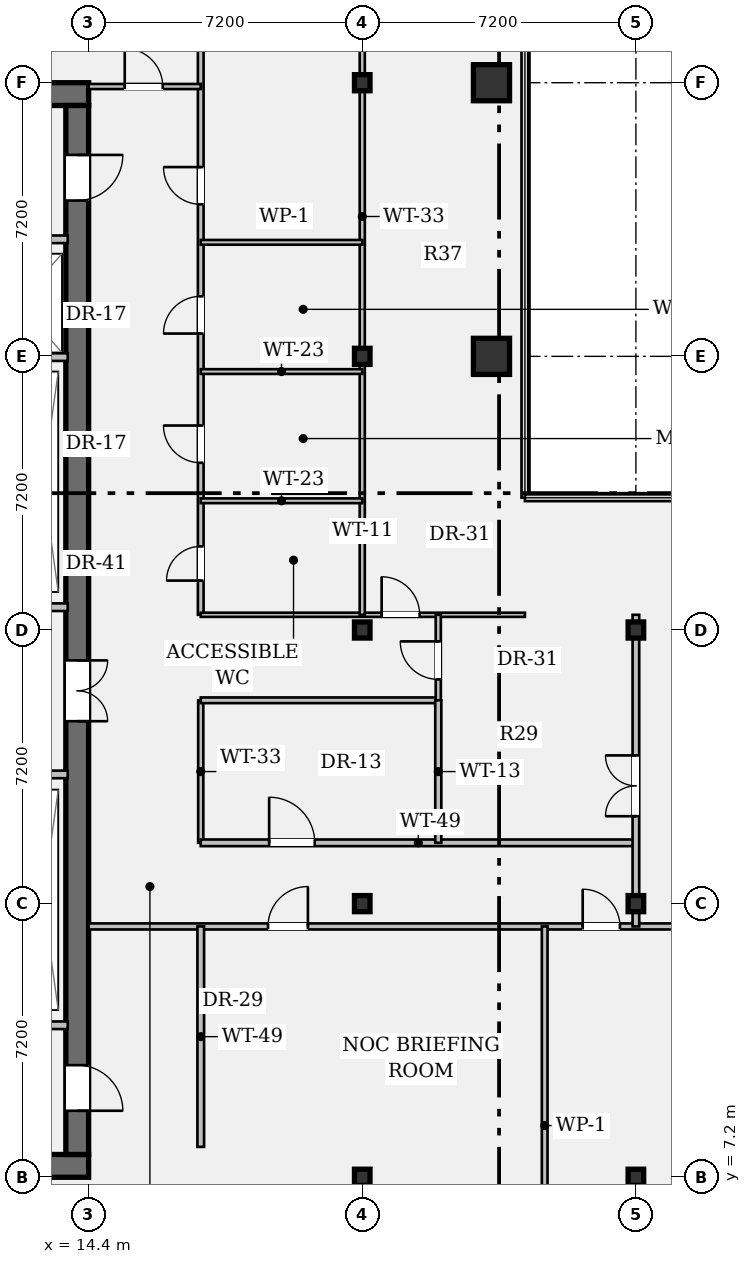
"""IFC4 building model, lengths in metres.
Left out: names, types, materials, properties, quantities, classifications, styles, units other than length and angle.
Written with IfcOpenShell. Run it as: python <this file> out.ifc"""

import sys

from ifc_helpers import new_model, si_unit, direction, frame, frame_2d, origin, origin_2d, place, context, subcontext, project, spatial, rectangle, hollow_rectangle, i_section, extrude, element, fill, save


model = new_model("IFC4")
c1 = context("Model", 3, precision=1e-05, world=origin(), true_north=direction((0.0, 1.0)))
c2 = subcontext(c1, "Body", "Model", "MODEL_VIEW")
j1 = project(units=[si_unit("LENGTHUNIT", "METRE"), si_unit("PLANEANGLEUNIT", "RADIAN")], contexts=[c1])
p1 = place(None, origin())
s1 = spatial("IfcSite", under=j1, at=p1, CompositionType="ELEMENT")
p2 = place(p1, origin())
s2 = spatial("IfcBuilding", under=s1, at=p2, CompositionType="ELEMENT")
p3 = place(p2, frame((0.0, 0.0, 97.65)))
s3 = spatial("IfcBuildingStorey", under=s2, at=p3, CompositionType="ELEMENT", Elevation=97.65)
for number, where, z_axis, x_axis in (
    (1, (0.6, 7.5, 0.0), (0.0, 0.0, 1.0), (1.0, 0.0, 0.0)),
    (2, (0.6, 35.7, 0.0), (0.0, 0.0, 1.0), (1.0, 0.0, 0.0)),
):
    element("IfcWall", number, at=place(p3, frame(where, z_axis=z_axis, x_axis=x_axis)), inside=s3, PredefinedType="SHEAR", context=c2, shape_type="SweptSolid", body=[
        extrude(rectangle(XDim=13.8, YDim=0.6, at=frame_2d((6.9, 0.0))), origin(), (0.0, 0.0, 1.0), 4.28),
    ])
p4 = place(p3, frame((14.1, 35.4, 0.0), z_axis=(0.0, 0.0, 1.0), x_axis=(0.0, -1.0, 0.0)))
e3 = element("IfcWall", 3, at=p4, inside=s3, PredefinedType="SHEAR", context=c2, shape_type="SweptSolid", body=[
    extrude(rectangle(XDim=27.6, YDim=0.6, at=frame_2d((13.8, 0.0))), origin(), (0.0, 0.0, 1.0), 4.28),
])
p5 = place(p4, frame((1.3, 0.0, 0.0)))
e4 = element("IfcOpeningElement", 4, at=p5, cuts=e3, PredefinedType="OPENING", context=c2, shape_type="SweptSolid", body=[
    extrude(rectangle(XDim=1.2, YDim=2.15, at=frame_2d((0.6, 1.075))), frame((0.0, 0.312, 0.0), z_axis=(0.0, -1.0, 0.0), x_axis=(1.0, 0.0, 0.0)), (0.0, 0.0, 1.0), 0.624),
])
p6 = place(p4, frame((25.25, 0.0, 0.0)))
e5 = element("IfcOpeningElement", 5, at=p6, cuts=e3, PredefinedType="OPENING", context=c2, shape_type="SweptSolid", body=[
    extrude(rectangle(XDim=1.2, YDim=2.15, at=frame_2d((0.6, 1.075))), frame((0.0, 0.312, 0.0), z_axis=(0.0, -1.0, 0.0), x_axis=(1.0, 0.0, 0.0)), (0.0, 0.0, 1.0), 0.624),
])
p7 = place(p4, frame((14.6, 0.0, 0.0)))
e6 = element("IfcOpeningElement", 6, at=p7, cuts=e3, PredefinedType="OPENING", context=c2, shape_type="SweptSolid", body=[
    extrude(rectangle(XDim=1.6, YDim=2.2, at=frame_2d((0.8, 1.1))), frame((0.0, 0.312, 0.0), z_axis=(0.0, -1.0, 0.0), x_axis=(1.0, 0.0, 0.0)), (0.0, 0.0, 1.0), 0.624),
])
for number, where, z_axis, x_axis in (
    (7, (21.6, 7.2, 0.0), (0.0, 0.0, 1.0), (1.0, 0.0, 0.0)),
    (8, (21.6, 14.4, 0.0), (0.0, 0.0, 1.0), (1.0, 0.0, 0.0)),
    (9, (21.6, 21.6, 0.0), (0.0, 0.0, 1.0), (1.0, 0.0, 0.0)),
    (10, (21.6, 28.8, 0.0), (0.0, 0.0, 1.0), (1.0, 0.0, 0.0)),
    (11, (21.6, 36.0, 0.0), (0.0, 0.0, 1.0), (1.0, 0.0, 0.0)),
):
    element("IfcColumn", number, at=place(p3, frame(where, z_axis=z_axis, x_axis=x_axis)), inside=s3, PredefinedType="COLUMN", context=c2, shape_type="SweptSolid", body=[
        extrude(i_section(OverallWidth=0.409, OverallDepth=0.424, WebThickness=0.033, FlangeThickness=0.052, FilletRadius=0.018, at=origin_2d()), origin(), (0.0, 0.0, 1.0), 4.28),
    ])
for number, where, z_axis, x_axis in (
    (12, (25.0, 28.8, 0.0), (0.0, 0.0, 1.0), (1.0, 0.0, 0.0)),
    (13, (25.0, 36.0, 0.0), (0.0, 0.0, 1.0), (1.0, 0.0, 0.0)),
):
    element("IfcColumn", number, at=place(p3, frame(where, z_axis=z_axis, x_axis=x_axis)), inside=s3, PredefinedType="COLUMN", context=c2, shape_type="SweptSolid", body=[
        extrude(hollow_rectangle(XDim=0.95, YDim=0.95, WallThickness=0.06, at=origin_2d()), origin(), (0.0, 0.0, 1.0), 4.28),
    ])
for number, where, z_axis, x_axis in (
    (14, (28.8, 7.2, 0.0), (0.0, 0.0, 1.0), (1.0, 0.0, 0.0)),
    (15, (28.8, 14.4, 0.0), (0.0, 0.0, 1.0), (1.0, 0.0, 0.0)),
    (16, (28.8, 21.6, 0.0), (0.0, 0.0, 1.0), (1.0, 0.0, 0.0)),
):
    element("IfcColumn", number, at=place(p3, frame(where, z_axis=z_axis, x_axis=x_axis)), inside=s3, PredefinedType="COLUMN", context=c2, shape_type="SweptSolid", body=[
        extrude(i_section(OverallWidth=0.409, OverallDepth=0.424, WebThickness=0.033, FlangeThickness=0.052, FilletRadius=0.018, at=origin_2d()), origin(), (0.0, 0.0, 1.0), 4.28),
    ])
p8 = place(p3, frame((8.7, 31.88, 0.0), z_axis=(0.0, 0.0, 1.0), x_axis=(1.0, 0.0, 0.0)))
e17 = element("IfcWall", 17, at=p8, inside=s3, PredefinedType="PARTITIONING", context=c2, shape_type="SweptSolid", body=[
    extrude(rectangle(XDim=5.15, YDim=0.2, at=frame_2d((2.575, 0.0))), origin(), (0.0, 0.0, 1.0), 4.28),
])
p9 = place(p8, frame((0.75, 0.0, 0.0)))
e18 = element("IfcOpeningElement", 18, at=p9, cuts=e17, PredefinedType="OPENING", context=c2, shape_type="SweptSolid", body=[
    extrude(rectangle(XDim=1.2, YDim=2.2, at=frame_2d((0.6, 1.1))), frame((0.0, 0.112, 0.0), z_axis=(0.0, -1.0, 0.0), x_axis=(1.0, 0.0, 0.0)), (0.0, 0.0, 1.0), 0.224),
])
p10 = place(p8, frame((3.25, 0.0, 0.0)))
e19 = element("IfcOpeningElement", 19, at=p10, cuts=e17, PredefinedType="OPENING", context=c2, shape_type="SweptSolid", body=[
    extrude(rectangle(XDim=1.2, YDim=2.2, at=frame_2d((0.6, 1.1))), frame((0.0, 0.112, 0.0), z_axis=(0.0, -1.0, 0.0), x_axis=(1.0, 0.0, 0.0)), (0.0, 0.0, 1.0), 0.224),
])
for number, where, z_axis, x_axis in (
    (20, (8.7, 11.2, 0.0), (0.0, 0.0, 1.0), (1.0, 0.0, 0.0)),
    (21, (8.7, 28.78, 0.0), (0.0, 0.0, 1.0), (1.0, 0.0, 0.0)),
):
    element("IfcWall", number, at=place(p3, frame(where, z_axis=z_axis, x_axis=x_axis)), inside=s3, PredefinedType="PARTITIONING", context=c2, shape_type="SweptSolid", body=[
        extrude(rectangle(XDim=5.15, YDim=0.2, at=frame_2d((2.575, 0.0))), origin(), (0.0, 0.0, 1.0), 4.28),
    ])
for number, where, z_axis, x_axis in (
    (22, (7.1, 22.2, 0.0), (0.0, 0.0, 1.0), (1.0, 0.0, 0.0)),
    (23, (7.1, 17.8, 0.0), (0.0, 0.0, 1.0), (1.0, 0.0, 0.0)),
):
    element("IfcWall", number, at=place(p3, frame(where, z_axis=z_axis, x_axis=x_axis)), inside=s3, PredefinedType="PARTITIONING", context=c2, shape_type="SweptSolid", body=[
        extrude(rectangle(XDim=6.75, YDim=0.2, at=frame_2d((3.375, 0.0))), origin(), (0.0, 0.0, 1.0), 4.28),
    ])
p11 = place(p3, frame((17.35, 22.0, 0.0), z_axis=(0.0, 0.0, 1.0), x_axis=(0.0, 1.0, 0.0)))
e24 = element("IfcWall", 24, at=p11, inside=s3, PredefinedType="PARTITIONING", context=c2, shape_type="SweptSolid", body=[
    extrude(rectangle(XDim=20.96, YDim=0.15, at=frame_2d((10.48, 0.0))), origin(), (0.0, 0.0, 1.0), 3.493),
])
p12 = place(p11, frame((0.9, 0.0, 0.0)))
e25 = element("IfcOpeningElement", 25, at=p12, cuts=e24, PredefinedType="OPENING", context=c2, shape_type="SweptSolid", body=[
    extrude(rectangle(XDim=0.9, YDim=2.15, at=frame_2d((0.45, 1.075))), frame((0.0, 0.087, 0.0), z_axis=(0.0, -1.0, 0.0), x_axis=(1.0, 0.0, 0.0)), (0.0, 0.0, 1.0), 0.174),
])
p13 = place(p11, frame((4.0, 0.0, 0.0)))
e26 = element("IfcOpeningElement", 26, at=p13, cuts=e24, PredefinedType="OPENING", context=c2, shape_type="SweptSolid", body=[
    extrude(rectangle(XDim=0.98, YDim=2.15, at=frame_2d((0.49, 1.075))), frame((0.0, 0.087, 0.0), z_axis=(0.0, -1.0, 0.0), x_axis=(1.0, 0.0, 0.0)), (0.0, 0.0, 1.0), 0.174),
])
p14 = place(p11, frame((7.4, 0.0, 0.0)))
e27 = element("IfcOpeningElement", 27, at=p14, cuts=e24, PredefinedType="OPENING", context=c2, shape_type="SweptSolid", body=[
    extrude(rectangle(XDim=0.98, YDim=2.15, at=frame_2d((0.49, 1.075))), frame((0.0, 0.087, 0.0), z_axis=(0.0, -1.0, 0.0), x_axis=(1.0, 0.0, 0.0)), (0.0, 0.0, 1.0), 0.174),
])
p15 = place(p11, frame((10.8, 0.0, 0.0)))
e28 = element("IfcOpeningElement", 28, at=p15, cuts=e24, PredefinedType="OPENING", context=c2, shape_type="SweptSolid", body=[
    extrude(rectangle(XDim=0.98, YDim=2.15, at=frame_2d((0.49, 1.075))), frame((0.0, 0.087, 0.0), z_axis=(0.0, -1.0, 0.0), x_axis=(1.0, 0.0, 0.0)), (0.0, 0.0, 1.0), 0.174),
])
p16 = place(p3, frame((14.4, 35.9, 0.0), z_axis=(0.0, 0.0, 1.0), x_axis=(1.0, 0.0, 0.0)))
e29 = element("IfcWall", 29, at=p16, inside=s3, PredefinedType="PARTITIONING", context=c2, shape_type="SweptSolid", body=[
    extrude(rectangle(XDim=2.95, YDim=0.135, at=frame_2d((1.475, 0.0))), origin(), (0.0, 0.0, 1.0), 3.493),
])
p17 = place(p16, frame((0.95, 0.0, 0.0)))
e30 = element("IfcOpeningElement", 30, at=p17, cuts=e29, PredefinedType="OPENING", context=c2, shape_type="SweptSolid", body=[
    extrude(rectangle(XDim=1.0, YDim=2.15, at=frame_2d((0.5, 1.075))), frame((0.0, 0.08, 0.0), z_axis=(0.0, -1.0, 0.0), x_axis=(1.0, 0.0, 0.0)), (0.0, 0.0, 1.0), 0.159),
])
p18 = place(p3, frame((17.35, 22.0, 0.0), z_axis=(0.0, 0.0, 1.0), x_axis=(1.0, 0.0, 0.0)))
e31 = element("IfcWall", 31, at=p18, inside=s3, PredefinedType="PARTITIONING", context=c2, shape_type="SweptSolid", body=[
    extrude(rectangle(XDim=8.53, YDim=0.11, at=frame_2d((4.265, 0.0))), origin(), (0.0, 0.0, 1.0), 3.493),
])
p19 = place(p18, frame((4.76, 0.0, 0.0)))
e32 = element("IfcOpeningElement", 32, at=p19, cuts=e31, PredefinedType="OPENING", context=c2, shape_type="SweptSolid", body=[
    extrude(rectangle(XDim=1.0, YDim=2.15, at=frame_2d((0.5, 1.075))), frame((0.0, 0.067, 0.0), z_axis=(0.0, -1.0, 0.0), x_axis=(1.0, 0.0, 0.0)), (0.0, 0.0, 1.0), 0.134),
])
p20 = place(p3, frame((14.4, 13.8, 0.0), z_axis=(0.0, 0.0, 1.0), x_axis=(1.0, 0.0, 0.0)))
e33 = element("IfcWall", 33, at=p20, inside=s3, PredefinedType="PARTITIONING", context=c2, shape_type="SweptSolid", body=[
    extrude(rectangle(XDim=32.68, YDim=0.16, at=frame_2d((16.34, 0.0))), origin(), (0.0, 0.0, 1.0), 3.493),
])
p21 = place(p20, frame((4.72, 0.0, 0.0)))
e34 = element("IfcOpeningElement", 34, at=p21, cuts=e33, PredefinedType="OPENING", context=c2, shape_type="SweptSolid", body=[
    extrude(rectangle(XDim=1.05, YDim=2.15, at=frame_2d((0.525, 1.075))), frame((0.0, 0.092, 0.0), z_axis=(0.0, -1.0, 0.0), x_axis=(1.0, 0.0, 0.0)), (0.0, 0.0, 1.0), 0.184),
])
p22 = place(p20, frame((13.0, 0.0, 0.0)))
e35 = element("IfcOpeningElement", 35, at=p22, cuts=e33, PredefinedType="OPENING", context=c2, shape_type="SweptSolid", body=[
    extrude(rectangle(XDim=0.98, YDim=2.15, at=frame_2d((0.49, 1.075))), frame((0.0, 0.092, 0.0), z_axis=(0.0, -1.0, 0.0), x_axis=(1.0, 0.0, 0.0)), (0.0, 0.0, 1.0), 0.184),
])
p23 = place(p3, frame((26.4, 3.32, 0.0), z_axis=(0.0, 0.0, 1.0), x_axis=(0.0, 1.0, 0.0)))
e36 = element("IfcWall", 36, at=p23, inside=s3, PredefinedType="PARTITIONING", context=c2, shape_type="SweptSolid", body=[
    extrude(rectangle(XDim=10.48, YDim=0.15, at=frame_2d((5.24, 0.0))), origin(), (0.0, 0.0, 1.0), 3.493),
])
p24 = place(p3, frame((21.6, 22.0, 0.0), z_axis=(0.0, 0.0, 1.0), x_axis=(0.0, 1.0, 0.0)))
e37 = element("IfcWall", 37, at=p24, inside=s3, PredefinedType="PARTITIONING", context=c2, shape_type="SweptSolid", body=[
    extrude(rectangle(XDim=20.96, YDim=0.135, at=frame_2d((10.48, 0.0))), origin(), (0.0, 0.0, 1.0), 3.493),
])
for number, where, z_axis, x_axis in (
    (38, (17.35, 25.0, 0.0), (0.0, 0.0, 1.0), (1.0, 0.0, 0.0)),
    (39, (17.35, 28.4, 0.0), (0.0, 0.0, 1.0), (1.0, 0.0, 0.0)),
    (40, (17.35, 31.8, 0.0), (0.0, 0.0, 1.0), (1.0, 0.0, 0.0)),
):
    element("IfcWall", number, at=place(p3, frame(where, z_axis=z_axis, x_axis=x_axis)), inside=s3, PredefinedType="PARTITIONING", context=c2, shape_type="SweptSolid", body=[
        extrude(rectangle(XDim=4.25, YDim=0.125, at=frame_2d((2.125, 0.0))), origin(), (0.0, 0.0, 1.0), 3.493),
    ])
p25 = place(p3, frame((17.35, 16.0, 0.0), z_axis=(0.0, 0.0, 1.0), x_axis=(0.0, 1.0, 0.0)))
e41 = element("IfcWall", 41, at=p25, inside=s3, PredefinedType="PARTITIONING", context=c2, shape_type="SweptSolid", body=[
    extrude(rectangle(XDim=3.75, YDim=0.135, at=frame_2d((1.875, 0.0))), origin(), (0.0, 0.0, 1.0), 4.28),
])
p26 = place(p3, frame((17.35, 8.0, 0.0), z_axis=(0.0, 0.0, 1.0), x_axis=(0.0, 1.0, 0.0)))
e42 = element("IfcWall", 42, at=p26, inside=s3, PredefinedType="PARTITIONING", context=c2, shape_type="SweptSolid", body=[
    extrude(rectangle(XDim=5.8, YDim=0.175, at=frame_2d((2.9, 0.0))), origin(), (0.0, 0.0, 1.0), 4.28),
])
p27 = place(p3, frame((17.35, 16.0, 0.0), z_axis=(0.0, 0.0, 1.0), x_axis=(1.0, 0.0, 0.0)))
e43 = element("IfcWall", 43, at=p27, inside=s3, PredefinedType="PARTITIONING", context=c2, shape_type="SweptSolid", body=[
    extrude(rectangle(XDim=11.45, YDim=0.175, at=frame_2d((5.725, 0.0))), origin(), (0.0, 0.0, 1.0), 3.493),
])
p28 = place(p27, frame((1.8, 0.0, 0.0)))
e44 = element("IfcOpeningElement", 44, at=p28, cuts=e43, PredefinedType="OPENING", context=c2, shape_type="SweptSolid", body=[
    extrude(rectangle(XDim=1.2, YDim=2.15, at=frame_2d((0.6, 1.075))), frame((0.0, 0.1, 0.0), z_axis=(0.0, -1.0, 0.0), x_axis=(1.0, 0.0, 0.0)), (0.0, 0.0, 1.0), 0.199),
])
p29 = place(p3, frame((17.35, 19.75, 0.0), z_axis=(0.0, 0.0, 1.0), x_axis=(1.0, 0.0, 0.0)))
e45 = element("IfcWall", 45, at=p29, inside=s3, PredefinedType="PARTITIONING", context=c2, shape_type="SweptSolid", body=[
    extrude(rectangle(XDim=6.25, YDim=0.15, at=frame_2d((3.125, 0.0))), origin(), (0.0, 0.0, 1.0), 3.493),
])
p30 = place(p3, frame((23.6, 19.75, 0.0), z_axis=(0.0, 0.0, 1.0), x_axis=(0.0, 1.0, 0.0)))
e46 = element("IfcWall", 46, at=p30, inside=s3, PredefinedType="PARTITIONING", context=c2, shape_type="SweptSolid", body=[
    extrude(rectangle(XDim=2.25, YDim=0.135, at=frame_2d((1.125, 0.0))), origin(), (0.0, 0.0, 1.0), 3.493),
])
p31 = place(p30, frame((0.55, 0.0, 0.0)))
e47 = element("IfcOpeningElement", 47, at=p31, cuts=e46, PredefinedType="OPENING", context=c2, shape_type="SweptSolid", body=[
    extrude(rectangle(XDim=1.0, YDim=2.15, at=frame_2d((0.5, 1.075))), frame((0.0, 0.08, 0.0), z_axis=(0.0, -1.0, 0.0), x_axis=(1.0, 0.0, 0.0)), (0.0, 0.0, 1.0), 0.159),
])
p32 = place(p3, frame((28.8, 13.8, 0.0), z_axis=(0.0, 0.0, 1.0), x_axis=(0.0, 1.0, 0.0)))
e48 = element("IfcWall", 48, at=p32, inside=s3, PredefinedType="PARTITIONING", context=c2, shape_type="SweptSolid", body=[
    extrude(rectangle(XDim=8.2, YDim=0.175, at=frame_2d((4.1, 0.0))), origin(), (0.0, 0.0, 1.0), 3.493),
])
p33 = place(p32, frame((2.9, 0.0, 0.0)))
e49 = element("IfcOpeningElement", 49, at=p33, cuts=e48, PredefinedType="OPENING", context=c2, shape_type="SweptSolid", body=[
    extrude(rectangle(XDim=1.6, YDim=2.2, at=frame_2d((0.8, 1.1))), frame((0.0, 0.1, 0.0), z_axis=(0.0, -1.0, 0.0), x_axis=(1.0, 0.0, 0.0)), (0.0, 0.0, 1.0), 0.199),
])
p34 = place(p3, frame((23.6, 16.0, 0.0), z_axis=(0.0, 0.0, 1.0), x_axis=(0.0, 1.0, 0.0)))
e50 = element("IfcWall", 50, at=p34, inside=s3, PredefinedType="PARTITIONING", context=c2, shape_type="SweptSolid", body=[
    extrude(rectangle(XDim=3.75, YDim=0.16, at=frame_2d((1.875, 0.0))), origin(), (0.0, 0.0, 1.0), 4.28),
])
p35 = place(p5, origin())
e51 = element("IfcDoor", 51, at=p35, inside=s3, OperationType="SINGLE_SWING_LEFT", PredefinedType="DOOR", context=c2, shape_type="SweptSolid", body=[
    extrude(rectangle(XDim=1.2, YDim=2.15, at=frame_2d((0.6, 1.075))), frame((0.0, 0.025, 0.0), z_axis=(0.0, -1.0, 0.0), x_axis=(1.0, 0.0, 0.0)), (0.0, 0.0, 1.0), 0.05),
])
fill(e4, e51)
p36 = place(p6, origin())
e52 = element("IfcDoor", 52, at=p36, inside=s3, OperationType="SINGLE_SWING_RIGHT", PredefinedType="DOOR", context=c2, shape_type="SweptSolid", body=[
    extrude(rectangle(XDim=1.2, YDim=2.15, at=frame_2d((0.6, 1.075))), frame((0.0, 0.025, 0.0), z_axis=(0.0, -1.0, 0.0), x_axis=(1.0, 0.0, 0.0)), (0.0, 0.0, 1.0), 0.05),
])
fill(e5, e52)
p37 = place(p7, origin())
e53 = element("IfcDoor", 53, at=p37, inside=s3, OperationType="DOUBLE_DOOR_SINGLE_SWING", PredefinedType="DOOR", context=c2, shape_type="SweptSolid", body=[
    extrude(rectangle(XDim=1.6, YDim=2.2, at=frame_2d((0.8, 1.1))), frame((0.0, 0.025, 0.0), z_axis=(0.0, -1.0, 0.0), x_axis=(1.0, 0.0, 0.0)), (0.0, 0.0, 1.0), 0.05),
])
fill(e6, e53)
p38 = place(p28, origin())
e54 = element("IfcDoor", 54, at=p38, inside=s3, OperationType="SINGLE_SWING_LEFT", PredefinedType="DOOR", context=c2, shape_type="SweptSolid", body=[
    extrude(rectangle(XDim=1.2, YDim=2.15, at=frame_2d((0.6, 1.075))), frame((0.0, 0.025, 0.0), z_axis=(0.0, -1.0, 0.0), x_axis=(1.0, 0.0, 0.0)), (0.0, 0.0, 1.0), 0.05),
])
fill(e44, e54)
p39 = place(p31, origin())
e55 = element("IfcDoor", 55, at=p39, inside=s3, OperationType="SINGLE_SWING_RIGHT", PredefinedType="DOOR", context=c2, shape_type="SweptSolid", body=[
    extrude(rectangle(XDim=1.0, YDim=2.15, at=frame_2d((0.5, 1.075))), frame((0.0, 0.025, 0.0), z_axis=(0.0, -1.0, 0.0), x_axis=(1.0, 0.0, 0.0)), (0.0, 0.0, 1.0), 0.05),
])
fill(e47, e55)
p40 = place(p33, origin())
e56 = element("IfcDoor", 56, at=p40, inside=s3, OperationType="DOUBLE_DOOR_SINGLE_SWING", PredefinedType="DOOR", context=c2, shape_type="SweptSolid", body=[
    extrude(rectangle(XDim=1.6, YDim=2.2, at=frame_2d((0.8, 1.1))), frame((0.0, 0.025, 0.0), z_axis=(0.0, -1.0, 0.0), x_axis=(1.0, 0.0, 0.0)), (0.0, 0.0, 1.0), 0.05),
])
fill(e49, e56)
p41 = place(p17, origin())
e57 = element("IfcDoor", 57, at=p41, inside=s3, OperationType="SINGLE_SWING_LEFT", PredefinedType="DOOR", context=c2, shape_type="SweptSolid", body=[
    extrude(rectangle(XDim=1.0, YDim=2.15, at=frame_2d((0.5, 1.075))), frame((0.0, 0.025, 0.0), z_axis=(0.0, -1.0, 0.0), x_axis=(1.0, 0.0, 0.0)), (0.0, 0.0, 1.0), 0.05),
])
fill(e30, e57)
p42 = place(p12, origin())
e58 = element("IfcDoor", 58, at=p42, inside=s3, OperationType="SINGLE_SWING_LEFT", PredefinedType="DOOR", context=c2, shape_type="SweptSolid", body=[
    extrude(rectangle(XDim=0.9, YDim=2.15, at=frame_2d((0.45, 1.075))), frame((0.0, 0.025, 0.0), z_axis=(0.0, -1.0, 0.0), x_axis=(1.0, 0.0, 0.0)), (0.0, 0.0, 1.0), 0.05),
])
fill(e25, e58)
p43 = place(p13, origin())
e59 = element("IfcDoor", 59, at=p43, inside=s3, OperationType="SINGLE_SWING_RIGHT", PredefinedType="DOOR", context=c2, shape_type="SweptSolid", body=[
    extrude(rectangle(XDim=0.98, YDim=2.15, at=frame_2d((0.49, 1.075))), frame((0.0, 0.025, 0.0), z_axis=(0.0, -1.0, 0.0), x_axis=(1.0, 0.0, 0.0)), (0.0, 0.0, 1.0), 0.05),
])
fill(e26, e59)
p44 = place(p14, origin())
e60 = element("IfcDoor", 60, at=p44, inside=s3, OperationType="SINGLE_SWING_LEFT", PredefinedType="DOOR", context=c2, shape_type="SweptSolid", body=[
    extrude(rectangle(XDim=0.98, YDim=2.15, at=frame_2d((0.49, 1.075))), frame((0.0, 0.025, 0.0), z_axis=(0.0, -1.0, 0.0), x_axis=(1.0, 0.0, 0.0)), (0.0, 0.0, 1.0), 0.05),
])
fill(e27, e60)
p45 = place(p15, origin())
e61 = element("IfcDoor", 61, at=p45, inside=s3, OperationType="SINGLE_SWING_RIGHT", PredefinedType="DOOR", context=c2, shape_type="SweptSolid", body=[
    extrude(rectangle(XDim=0.98, YDim=2.15, at=frame_2d((0.49, 1.075))), frame((0.0, 0.025, 0.0), z_axis=(0.0, -1.0, 0.0), x_axis=(1.0, 0.0, 0.0)), (0.0, 0.0, 1.0), 0.05),
])
fill(e28, e61)
p46 = place(p19, origin())
e62 = element("IfcDoor", 62, at=p46, inside=s3, OperationType="SINGLE_SWING_LEFT", PredefinedType="DOOR", context=c2, shape_type="SweptSolid", body=[
    extrude(rectangle(XDim=1.0, YDim=2.15, at=frame_2d((0.5, 1.075))), frame((0.0, 0.025, 0.0), z_axis=(0.0, -1.0, 0.0), x_axis=(1.0, 0.0, 0.0)), (0.0, 0.0, 1.0), 0.05),
])
fill(e32, e62)
p47 = place(p21, origin())
e63 = element("IfcDoor", 63, at=p47, inside=s3, OperationType="SINGLE_SWING_RIGHT", PredefinedType="DOOR", context=c2, shape_type="SweptSolid", body=[
    extrude(rectangle(XDim=1.05, YDim=2.15, at=frame_2d((0.525, 1.075))), frame((0.0, 0.025, 0.0), z_axis=(0.0, -1.0, 0.0), x_axis=(1.0, 0.0, 0.0)), (0.0, 0.0, 1.0), 0.05),
])
fill(e34, e63)
p48 = place(p22, origin())
e64 = element("IfcDoor", 64, at=p48, inside=s3, OperationType="SINGLE_SWING_LEFT", PredefinedType="DOOR", context=c2, shape_type="SweptSolid", body=[
    extrude(rectangle(XDim=0.98, YDim=2.15, at=frame_2d((0.49, 1.075))), frame((0.0, 0.025, 0.0), z_axis=(0.0, -1.0, 0.0), x_axis=(1.0, 0.0, 0.0)), (0.0, 0.0, 1.0), 0.05),
])
fill(e35, e64)
save(model, sys.argv[1])
